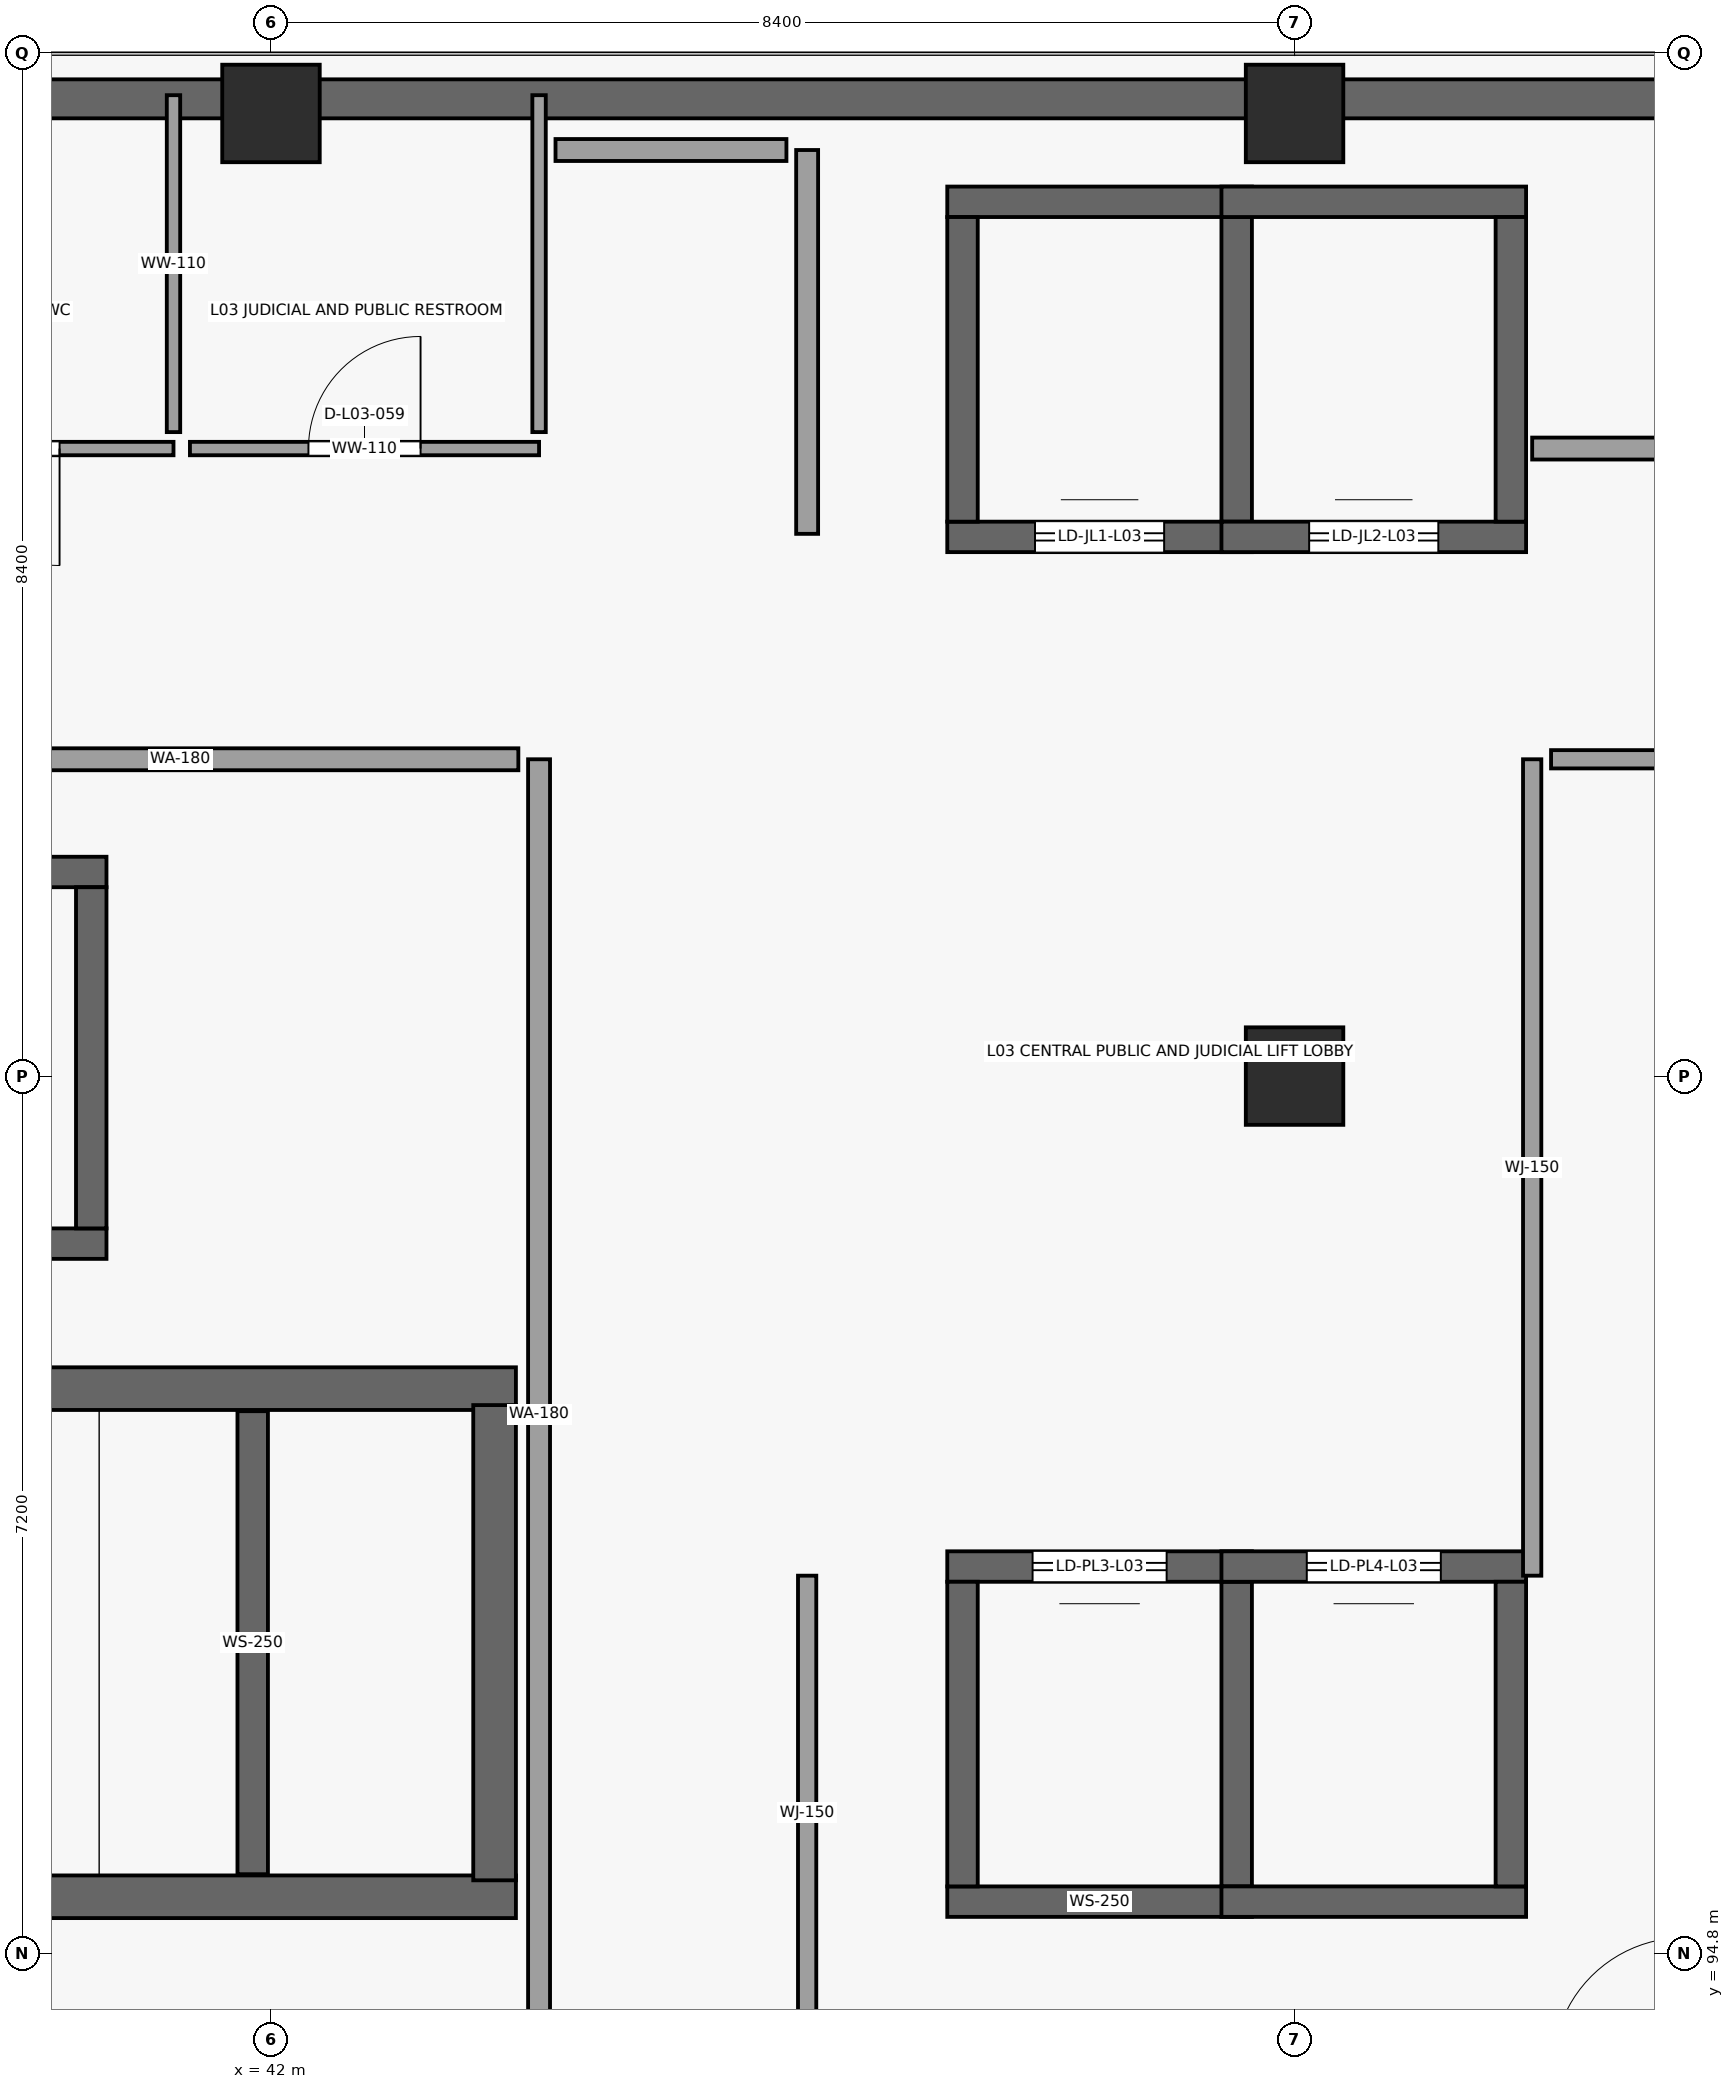
"""IFC4 building model, lengths in metres.
Left out: names, types, materials, properties, quantities, classifications, styles, units other than length and angle.
Written with IfcOpenShell. Run it as: python <this file> out.ifc"""

import sys

from ifc_helpers import new_model, si_unit, direction, frame, frame_2d, origin, origin_2d, place, context, subcontext, project, spatial, rectangle, extrude, element, fill, save


model = new_model("IFC4")
c1 = context("Model", 3, precision=1e-05, world=origin(), true_north=direction((0.0, 1.0)))
c2 = subcontext(c1, "Body", "Model", "MODEL_VIEW")
j1 = project(units=[si_unit("LENGTHUNIT", "METRE"), si_unit("PLANEANGLEUNIT", "RADIAN")], contexts=[c1])
p1 = place(None, origin())
s1 = spatial("IfcSite", under=j1, at=p1, CompositionType="ELEMENT")
p2 = place(p1, origin())
s2 = spatial("IfcBuilding", under=s1, at=p2, CompositionType="ELEMENT")
p3 = place(p2, frame((0.0, 0.0, 10.2)))
s3 = spatial("IfcBuildingStorey", under=s2, at=p3, CompositionType="ELEMENT", Elevation=10.2)
p4 = place(p3, frame((42.0, 109.9, 0.0), z_axis=(0.0, 0.0, 1.0), x_axis=(1.0, 0.0, 0.0)))
e1 = element("IfcColumn", 1, at=p4, inside=s3, PredefinedType="COLUMN", context=c2, shape_type="SweptSolid", body=[
    extrude(rectangle(XDim=0.85, YDim=0.85, at=origin_2d()), origin(), (0.0, 0.0, 1.0), 5.1),
])
p5 = place(p3, frame((50.4, 102.0, 0.0), z_axis=(0.0, 0.0, 1.0), x_axis=(1.0, 0.0, 0.0)))
e2 = element("IfcColumn", 2, at=p5, inside=s3, PredefinedType="COLUMN", context=c2, shape_type="SweptSolid", body=[
    extrude(rectangle(XDim=0.9, YDim=0.9, at=origin_2d()), origin(), (0.0, 0.0, 1.0), 5.1),
])
p6 = place(p3, frame((50.4, 109.9, 0.0), z_axis=(0.0, 0.0, 1.0), x_axis=(1.0, 0.0, 0.0)))
e3 = element("IfcColumn", 3, at=p6, inside=s3, PredefinedType="COLUMN", context=c2, shape_type="SweptSolid", body=[
    extrude(rectangle(XDim=0.85, YDim=0.85, at=origin_2d()), origin(), (0.0, 0.0, 1.0), 5.1),
])
p7 = place(p3, frame((33.6, 110.02, 0.0), z_axis=(0.0, 0.0, 1.0), x_axis=(1.0, 0.0, 0.0)))
e4 = element("IfcWall", 4, at=p7, inside=s3, PredefinedType="SOLIDWALL", context=c2, shape_type="SweptSolid", body=[
    extrude(rectangle(XDim=33.6, YDim=0.32, at=frame_2d((16.8, 0.0))), origin(), (0.0, 0.0, 1.0), 4.82),
])
p8 = place(p3, frame((34.79, 95.265, 0.0), z_axis=(0.0, 0.0, 1.0), x_axis=(1.0, 0.0, 0.0)))
e5 = element("IfcWall", 5, at=p8, inside=s3, PredefinedType="SHEAR", context=c2, shape_type="SweptSolid", body=[
    extrude(rectangle(XDim=9.22, YDim=0.35, at=frame_2d((4.61, 0.0))), origin(), (0.0, 0.0, 1.0), 4.82),
])
p9 = place(p8, frame((0.45, 0.0, 0.0)))
e6 = element("IfcOpeningElement", 6, at=p9, cuts=e5, PredefinedType="OPENING", context=c2, shape_type="SweptSolid", body=[
    extrude(rectangle(XDim=1.25, YDim=2.2, at=frame_2d((0.625, 1.1))), frame((0.0, 0.185, 0.0), z_axis=(0.0, -1.0, 0.0), x_axis=(1.0, 0.0, 0.0)), (0.0, 0.0, 1.0), 0.37),
])
p10 = place(p3, frame((44.01, 99.435, 0.0), z_axis=(0.0, 0.0, 1.0), x_axis=(-1.0, 0.0, 0.0)))
e7 = element("IfcWall", 7, at=p10, inside=s3, PredefinedType="SHEAR", context=c2, shape_type="SweptSolid", body=[
    extrude(rectangle(XDim=9.22, YDim=0.35, at=frame_2d((4.61, 0.0))), origin(), (0.0, 0.0, 1.0), 4.82),
])
p11 = place(p10, frame((7.72, 0.0, 0.0)))
e8 = element("IfcOpeningElement", 8, at=p11, cuts=e7, PredefinedType="OPENING", context=c2, shape_type="SweptSolid", body=[
    extrude(rectangle(XDim=1.2, YDim=2.2, at=frame_2d((0.6, 1.1))), frame((0.0, 0.185, 0.0), z_axis=(0.0, -1.0, 0.0), x_axis=(1.0, 0.0, 0.0)), (0.0, 0.0, 1.0), 0.37),
])
p12 = place(p3, frame((43.835, 99.3, 0.0), z_axis=(0.0, 0.0, 1.0), x_axis=(0.0, -1.0, 0.0)))
e9 = element("IfcWall", 9, at=p12, inside=s3, PredefinedType="SHEAR", context=c2, shape_type="SweptSolid", body=[
    extrude(rectangle(XDim=3.9, YDim=0.35, at=frame_2d((1.95, 0.0))), origin(), (0.0, 0.0, 1.0), 4.82),
])
p13 = place(p3, frame((41.85, 95.45, 0.0), z_axis=(0.0, 0.0, 1.0), x_axis=(0.0, 1.0, 0.0)))
e10 = element("IfcWall", 10, at=p13, inside=s3, PredefinedType="SHEAR", context=c2, shape_type="SweptSolid", body=[
    extrude(rectangle(XDim=3.8, YDim=0.25, at=frame_2d((1.9, 0.0))), origin(), (0.0, 0.0, 1.0), 2.37),
])
p14 = place(p3, frame((47.55, 95.225, 0.0), z_axis=(0.0, 0.0, 1.0), x_axis=(1.0, 0.0, 0.0)))
e11 = element("IfcWall", 11, at=p14, inside=s3, PredefinedType="SHEAR", context=c2, shape_type="SweptSolid", body=[
    extrude(rectangle(XDim=2.5, YDim=0.25, at=frame_2d((1.25, 0.0))), origin(), (0.0, 0.0, 1.0), 4.82),
])
p15 = place(p3, frame((50.05, 97.975, 0.0), z_axis=(0.0, 0.0, 1.0), x_axis=(-1.0, 0.0, 0.0)))
e12 = element("IfcWall", 12, at=p15, inside=s3, PredefinedType="SHEAR", context=c2, shape_type="SweptSolid", body=[
    extrude(rectangle(XDim=2.5, YDim=0.25, at=frame_2d((1.25, 0.0))), origin(), (0.0, 0.0, 1.0), 4.82),
])
p16 = place(p15, frame((0.7, 0.0, 0.0)))
e13 = element("IfcOpeningElement", 13, at=p16, cuts=e12, PredefinedType="OPENING", context=c2, shape_type="SweptSolid", body=[
    extrude(rectangle(XDim=1.1, YDim=2.2, at=frame_2d((0.55, 1.1))), frame((0.0, 0.135, 0.0), z_axis=(0.0, -1.0, 0.0), x_axis=(1.0, 0.0, 0.0)), (0.0, 0.0, 1.0), 0.27),
])
for number, where, z_axis, x_axis in (
    (14, (47.675, 95.35, 0.0), (0.0, 0.0, 1.0), (0.0, 1.0, 0.0)),
    (15, (49.925, 97.85, 0.0), (0.0, 0.0, 1.0), (0.0, -1.0, 0.0)),
    (16, (49.8, 95.225, 0.0), (0.0, 0.0, 1.0), (1.0, 0.0, 0.0)),
):
    element("IfcWall", number, at=place(p3, frame(where, z_axis=z_axis, x_axis=x_axis)), inside=s3, PredefinedType="SHEAR", context=c2, shape_type="SweptSolid", body=[
        extrude(rectangle(XDim=2.5, YDim=0.25, at=frame_2d((1.25, 0.0))), origin(), (0.0, 0.0, 1.0), 4.82),
    ])
p17 = place(p3, frame((52.3, 97.975, 0.0), z_axis=(0.0, 0.0, 1.0), x_axis=(-1.0, 0.0, 0.0)))
e17 = element("IfcWall", 17, at=p17, inside=s3, PredefinedType="SHEAR", context=c2, shape_type="SweptSolid", body=[
    extrude(rectangle(XDim=2.5, YDim=0.25, at=frame_2d((1.25, 0.0))), origin(), (0.0, 0.0, 1.0), 4.82),
])
p18 = place(p17, frame((0.7, 0.0, 0.0)))
e18 = element("IfcOpeningElement", 18, at=p18, cuts=e17, PredefinedType="OPENING", context=c2, shape_type="SweptSolid", body=[
    extrude(rectangle(XDim=1.1, YDim=2.2, at=frame_2d((0.55, 1.1))), frame((0.0, 0.135, 0.0), z_axis=(0.0, -1.0, 0.0), x_axis=(1.0, 0.0, 0.0)), (0.0, 0.0, 1.0), 0.27),
])
p19 = place(p3, frame((52.175, 97.85, 0.0), z_axis=(0.0, 0.0, 1.0), x_axis=(0.0, -1.0, 0.0)))
e19 = element("IfcWall", 19, at=p19, inside=s3, PredefinedType="SHEAR", context=c2, shape_type="SweptSolid", body=[
    extrude(rectangle(XDim=2.5, YDim=0.25, at=frame_2d((1.25, 0.0))), origin(), (0.0, 0.0, 1.0), 4.82),
])
p20 = place(p3, frame((47.55, 106.425, 0.0), z_axis=(0.0, 0.0, 1.0), x_axis=(1.0, 0.0, 0.0)))
e20 = element("IfcWall", 20, at=p20, inside=s3, PredefinedType="SHEAR", context=c2, shape_type="SweptSolid", body=[
    extrude(rectangle(XDim=2.5, YDim=0.25, at=frame_2d((1.25, 0.0))), origin(), (0.0, 0.0, 1.0), 4.82),
])
p21 = place(p20, frame((0.72, 0.0, 0.0)))
e21 = element("IfcOpeningElement", 21, at=p21, cuts=e20, PredefinedType="OPENING", context=c2, shape_type="SweptSolid", body=[
    extrude(rectangle(XDim=1.06, YDim=2.2, at=frame_2d((0.53, 1.1))), frame((0.0, 0.135, 0.0), z_axis=(0.0, -1.0, 0.0), x_axis=(1.0, 0.0, 0.0)), (0.0, 0.0, 1.0), 0.27),
])
for number, where, z_axis, x_axis in (
    (22, (50.05, 109.175, 0.0), (0.0, 0.0, 1.0), (-1.0, 0.0, 0.0)),
    (23, (47.675, 106.55, 0.0), (0.0, 0.0, 1.0), (0.0, 1.0, 0.0)),
    (24, (49.925, 109.05, 0.0), (0.0, 0.0, 1.0), (0.0, -1.0, 0.0)),
):
    element("IfcWall", number, at=place(p3, frame(where, z_axis=z_axis, x_axis=x_axis)), inside=s3, PredefinedType="SHEAR", context=c2, shape_type="SweptSolid", body=[
        extrude(rectangle(XDim=2.5, YDim=0.25, at=frame_2d((1.25, 0.0))), origin(), (0.0, 0.0, 1.0), 4.82),
    ])
p22 = place(p3, frame((49.8, 106.425, 0.0), z_axis=(0.0, 0.0, 1.0), x_axis=(1.0, 0.0, 0.0)))
e25 = element("IfcWall", 25, at=p22, inside=s3, PredefinedType="SHEAR", context=c2, shape_type="SweptSolid", body=[
    extrude(rectangle(XDim=2.5, YDim=0.25, at=frame_2d((1.25, 0.0))), origin(), (0.0, 0.0, 1.0), 4.82),
])
p23 = place(p22, frame((0.72, 0.0, 0.0)))
e26 = element("IfcOpeningElement", 26, at=p23, cuts=e25, PredefinedType="OPENING", context=c2, shape_type="SweptSolid", body=[
    extrude(rectangle(XDim=1.06, YDim=2.2, at=frame_2d((0.53, 1.1))), frame((0.0, 0.135, 0.0), z_axis=(0.0, -1.0, 0.0), x_axis=(1.0, 0.0, 0.0)), (0.0, 0.0, 1.0), 0.27),
])
for number, where, z_axis, x_axis in (
    (27, (52.3, 109.175, 0.0), (0.0, 0.0, 1.0), (-1.0, 0.0, 0.0)),
    (28, (52.175, 109.05, 0.0), (0.0, 0.0, 1.0), (0.0, -1.0, 0.0)),
):
    element("IfcWall", number, at=place(p3, frame(where, z_axis=z_axis, x_axis=x_axis)), inside=s3, PredefinedType="SHEAR", context=c2, shape_type="SweptSolid", body=[
        extrude(rectangle(XDim=2.5, YDim=0.25, at=frame_2d((1.25, 0.0))), origin(), (0.0, 0.0, 1.0), 4.82),
    ])
for number, where, z_axis, x_axis in (
    (29, (37.95, 100.625, 0.0), (0.0, 0.0, 1.0), (1.0, 0.0, 0.0)),
    (30, (40.65, 103.675, 0.0), (0.0, 0.0, 1.0), (-1.0, 0.0, 0.0)),
):
    element("IfcWall", number, at=place(p3, frame(where, z_axis=z_axis, x_axis=x_axis)), inside=s3, PredefinedType="SHEAR", context=c2, shape_type="SweptSolid", body=[
        extrude(rectangle(XDim=2.7, YDim=0.25, at=frame_2d((1.35, 0.0))), origin(), (0.0, 0.0, 1.0), 4.82),
    ])
p24 = place(p3, frame((40.525, 103.55, 0.0), z_axis=(0.0, 0.0, 1.0), x_axis=(0.0, -1.0, 0.0)))
e31 = element("IfcWall", 31, at=p24, inside=s3, PredefinedType="SHEAR", context=c2, shape_type="SweptSolid", body=[
    extrude(rectangle(XDim=2.8, YDim=0.25, at=frame_2d((1.4, 0.0))), origin(), (0.0, 0.0, 1.0), 4.82),
])
p25 = place(p3, frame((64.35, 107.15, 0.0), z_axis=(0.0, 0.0, 1.0), x_axis=(-1.0, 0.0, 0.0)))
e32 = element("IfcWall", 32, at=p25, inside=s3, PredefinedType="PARTITIONING", context=c2, shape_type="SweptSolid", body=[
    extrude(rectangle(XDim=12.0, YDim=0.18, at=frame_2d((6.0, 0.0))), origin(), (0.0, 0.0, 1.0), 4.82),
])
p26 = place(p3, frame((44.2, 104.6, 0.0), z_axis=(0.0, 0.0, 1.0), x_axis=(0.0, -1.0, 0.0)))
e33 = element("IfcWall", 33, at=p26, inside=s3, PredefinedType="PARTITIONING", context=c2, shape_type="SweptSolid", body=[
    extrude(rectangle(XDim=10.75, YDim=0.18, at=frame_2d((5.375, 0.0))), origin(), (0.0, 0.0, 1.0), 4.82),
])
p27 = place(p3, frame((52.35, 97.9, 0.0), z_axis=(0.0, 0.0, 1.0), x_axis=(0.0, 1.0, 0.0)))
e34 = element("IfcWall", 34, at=p27, inside=s3, PredefinedType="PARTITIONING", context=c2, shape_type="SweptSolid", body=[
    extrude(rectangle(XDim=6.7, YDim=0.15, at=frame_2d((3.35, 0.0))), origin(), (0.0, 0.0, 1.0), 4.82),
])
p28 = place(p3, frame((38.48, 104.6, 0.0), z_axis=(0.0, 0.0, 1.0), x_axis=(1.0, 0.0, 0.0)))
e35 = element("IfcWall", 35, at=p28, inside=s3, PredefinedType="PARTITIONING", context=c2, shape_type="SweptSolid", body=[
    extrude(rectangle(XDim=5.55, YDim=0.18, at=frame_2d((2.775, 0.0))), origin(), (0.0, 0.0, 1.0), 4.82),
])
p29 = place(p3, frame((46.4, 94.005, 0.0), z_axis=(0.0, 0.0, 1.0), x_axis=(0.0, 1.0, 0.0)))
e36 = element("IfcWall", 36, at=p29, inside=s3, PredefinedType="PARTITIONING", context=c2, shape_type="SweptSolid", body=[
    extrude(rectangle(XDim=3.895, YDim=0.15, at=frame_2d((1.948, 0.0))), origin(), (0.0, 0.0, 1.0), 4.82),
])
p30 = place(p3, frame((46.4, 106.45, 0.0), z_axis=(0.0, 0.0, 1.0), x_axis=(0.0, 1.0, 0.0)))
e37 = element("IfcWall", 37, at=p30, inside=s3, PredefinedType="PARTITIONING", context=c2, shape_type="SweptSolid", body=[
    extrude(rectangle(XDim=3.15, YDim=0.18, at=frame_2d((1.575, 0.0))), origin(), (0.0, 0.0, 1.0), 4.82),
])
p31 = place(p3, frame((41.2, 107.15, 0.0), z_axis=(0.0, 0.0, 1.0), x_axis=(-1.0, 0.0, 0.0)))
e38 = element("IfcWall", 38, at=p31, inside=s3, PredefinedType="PARTITIONING", context=c2, shape_type="SweptSolid", body=[
    extrude(rectangle(XDim=2.83, YDim=0.11, at=frame_2d((1.415, 0.0))), origin(), (0.0, 0.0, 1.0), 4.82),
])
p32 = place(p31, frame((0.935, 0.0, 0.0)))
e39 = element("IfcOpeningElement", 39, at=p32, cuts=e38, PredefinedType="OPENING", context=c2, shape_type="SweptSolid", body=[
    extrude(rectangle(XDim=0.96, YDim=2.14, at=frame_2d((0.48, 1.07))), frame((0.0, 0.065, 0.0), z_axis=(0.0, -1.0, 0.0), x_axis=(1.0, 0.0, 0.0)), (0.0, 0.0, 1.0), 0.13),
])
p33 = place(p3, frame((44.2, 107.15, 0.0), z_axis=(0.0, 0.0, 1.0), x_axis=(-1.0, 0.0, 0.0)))
e40 = element("IfcWall", 40, at=p33, inside=s3, PredefinedType="PARTITIONING", context=c2, shape_type="SweptSolid", body=[
    extrude(rectangle(XDim=2.865, YDim=0.11, at=frame_2d((1.433, 0.0))), origin(), (0.0, 0.0, 1.0), 4.82),
])
p34 = place(p33, frame((0.972, 0.0, 0.0)))
e41 = element("IfcOpeningElement", 41, at=p34, cuts=e40, PredefinedType="OPENING", context=c2, shape_type="SweptSolid", body=[
    extrude(rectangle(XDim=0.92, YDim=2.12, at=frame_2d((0.46, 1.06))), frame((0.0, 0.065, 0.0), z_axis=(0.0, -1.0, 0.0), x_axis=(1.0, 0.0, 0.0)), (0.0, 0.0, 1.0), 0.13),
])
for number, where, z_axis, x_axis in (
    (42, (41.2, 110.05, 0.0), (0.0, 0.0, 1.0), (0.0, -1.0, 0.0)),
    (43, (44.2, 110.05, 0.0), (0.0, 0.0, 1.0), (0.0, -1.0, 0.0)),
):
    element("IfcWall", number, at=place(p3, frame(where, z_axis=z_axis, x_axis=x_axis)), inside=s3, PredefinedType="PARTITIONING", context=c2, shape_type="SweptSolid", body=[
        extrude(rectangle(XDim=2.765, YDim=0.11, at=frame_2d((1.383, 0.0))), origin(), (0.0, 0.0, 1.0), 4.82),
    ])
p35 = place(p3, frame((52.505, 104.6, 0.0), z_axis=(0.0, 0.0, 1.0), x_axis=(1.0, 0.0, 0.0)))
e44 = element("IfcWall", 44, at=p35, inside=s3, PredefinedType="PARTITIONING", context=c2, shape_type="SweptSolid", body=[
    extrude(rectangle(XDim=2.575, YDim=0.15, at=frame_2d((1.288, 0.0))), origin(), (0.0, 0.0, 1.0), 4.82),
])
p36 = place(p3, frame((46.23, 109.6, 0.0), z_axis=(0.0, 0.0, 1.0), x_axis=(-1.0, 0.0, 0.0)))
e45 = element("IfcWall", 45, at=p36, inside=s3, PredefinedType="PARTITIONING", context=c2, shape_type="SweptSolid", body=[
    extrude(rectangle(XDim=1.895, YDim=0.18, at=frame_2d((0.948, 0.0))), origin(), (0.0, 0.0, 1.0), 3.9),
])
p37 = place(p16, origin())
e46 = element("IfcDoor", 46, at=p37, inside=s3, OperationType="SLIDING_TO_RIGHT", PredefinedType="DOOR", context=c2, shape_type="SweptSolid", body=[
    extrude(rectangle(XDim=1.1, YDim=2.2, at=frame_2d((0.55, 1.1))), frame((0.0, 0.025, 0.0), z_axis=(0.0, -1.0, 0.0), x_axis=(1.0, 0.0, 0.0)), (0.0, 0.0, 1.0), 0.05),
])
fill(e13, e46)
p38 = place(p18, origin())
e47 = element("IfcDoor", 47, at=p38, inside=s3, OperationType="SLIDING_TO_RIGHT", PredefinedType="DOOR", context=c2, shape_type="SweptSolid", body=[
    extrude(rectangle(XDim=1.1, YDim=2.2, at=frame_2d((0.55, 1.1))), frame((0.0, 0.025, 0.0), z_axis=(0.0, -1.0, 0.0), x_axis=(1.0, 0.0, 0.0)), (0.0, 0.0, 1.0), 0.05),
])
fill(e18, e47)
p39 = place(p21, origin())
e48 = element("IfcDoor", 48, at=p39, inside=s3, OperationType="SLIDING_TO_RIGHT", PredefinedType="DOOR", context=c2, shape_type="SweptSolid", body=[
    extrude(rectangle(XDim=1.06, YDim=2.2, at=frame_2d((0.53, 1.1))), frame((0.0, 0.025, 0.0), z_axis=(0.0, -1.0, 0.0), x_axis=(1.0, 0.0, 0.0)), (0.0, 0.0, 1.0), 0.05),
])
fill(e21, e48)
p40 = place(p23, origin())
e49 = element("IfcDoor", 49, at=p40, inside=s3, OperationType="SLIDING_TO_RIGHT", PredefinedType="DOOR", context=c2, shape_type="SweptSolid", body=[
    extrude(rectangle(XDim=1.06, YDim=2.2, at=frame_2d((0.53, 1.1))), frame((0.0, 0.025, 0.0), z_axis=(0.0, -1.0, 0.0), x_axis=(1.0, 0.0, 0.0)), (0.0, 0.0, 1.0), 0.05),
])
fill(e26, e49)
p41 = place(p32, origin())
e50 = element("IfcDoor", 50, at=p41, inside=s3, OperationType="SINGLE_SWING_LEFT", PredefinedType="DOOR", context=c2, shape_type="SweptSolid", body=[
    extrude(rectangle(XDim=0.96, YDim=2.14, at=frame_2d((0.48, 1.07))), frame((0.0, 0.025, 0.0), z_axis=(0.0, -1.0, 0.0), x_axis=(1.0, 0.0, 0.0)), (0.0, 0.0, 1.0), 0.05),
])
fill(e39, e50)
p42 = place(p34, origin())
e51 = element("IfcDoor", 51, at=p42, inside=s3, OperationType="SINGLE_SWING_RIGHT", PredefinedType="DOOR", context=c2, shape_type="SweptSolid", body=[
    extrude(rectangle(XDim=0.92, YDim=2.12, at=frame_2d((0.46, 1.06))), frame((0.0, 0.025, 0.0), z_axis=(0.0, -1.0, 0.0), x_axis=(1.0, 0.0, 0.0)), (0.0, 0.0, 1.0), 0.05),
])
fill(e41, e51)
save(model, sys.argv[1])
